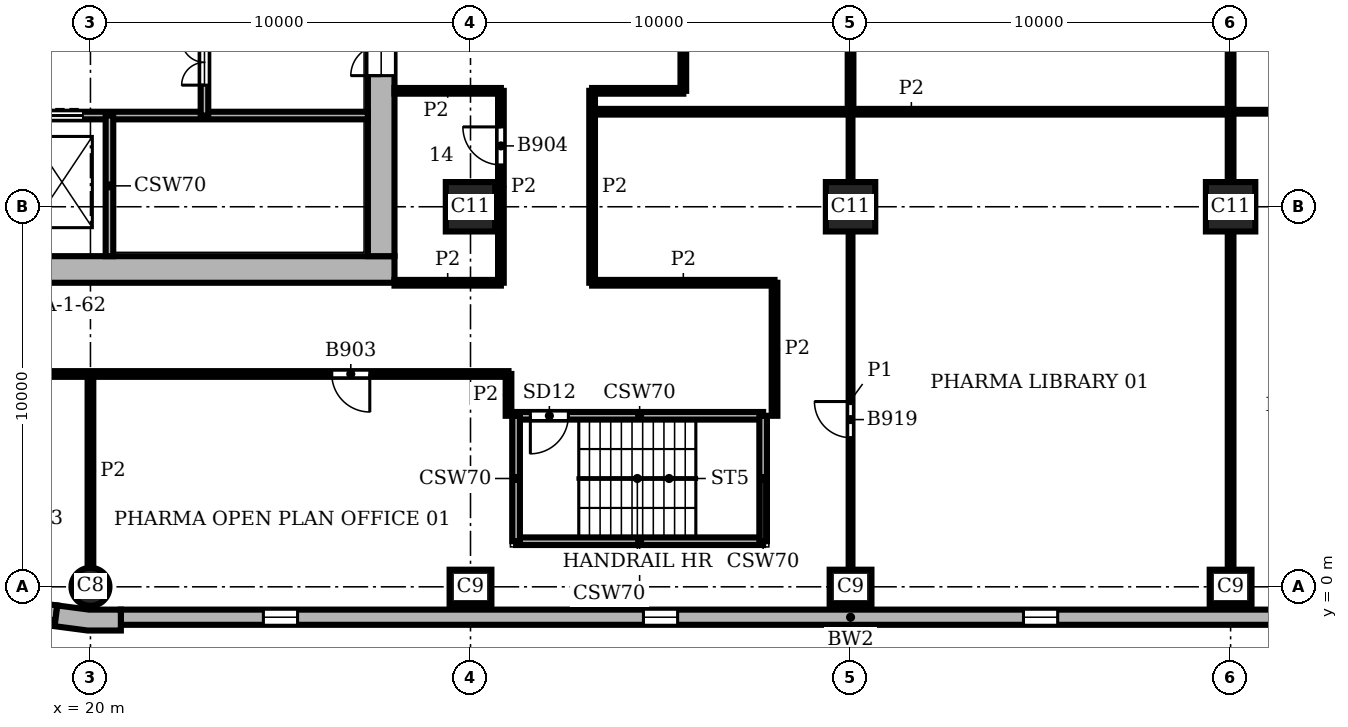
"""IFC4 building model, lengths in metres.
Left out: names, types, materials, properties, quantities, classifications, styles, units other than length and angle.
Written with IfcOpenShell. Run it as: python <this file> out.ifc"""

import sys

from ifc_helpers import new_model, si_unit, direction, frame, frame_2d, origin, origin_2d, place, context, subcontext, project, spatial, polyline, rectangle, circle, outline, extrude, element, fill, save


model = new_model("IFC4")
c1 = context("Model", 3, precision=1e-05, world=origin(), true_north=direction((0.0, 1.0)))
c2 = subcontext(c1, "Body", "Model", "MODEL_VIEW")
j1 = project(units=[si_unit("LENGTHUNIT", "METRE"), si_unit("PLANEANGLEUNIT", "RADIAN")], contexts=[c1])
p1 = place(None, origin())
s1 = spatial("IfcSite", under=j1, at=p1, CompositionType="ELEMENT")
p2 = place(p1, origin())
s2 = spatial("IfcBuilding", under=s1, at=p2, CompositionType="ELEMENT")
p3 = place(p2, frame((0.0, 0.0, 233.1)))
s3 = spatial("IfcBuildingStorey", under=s2, at=p3, CompositionType="ELEMENT", Elevation=233.1)
p4 = place(p3, frame((20.0, 0.0, 0.0), z_axis=(0.0, 0.0, 1.0), x_axis=(1.0, 0.0, 0.0)))
e1 = element("IfcColumn", 1, at=p4, inside=s3, PredefinedType="COLUMN", context=c2, shape_type="SweptSolid", body=[
    extrude(circle(Radius=0.5, at=origin_2d()), origin(), (0.0, 0.0, 1.0), 3.9),
])
for number, where, z_axis, x_axis in (
    (2, (30.0, 0.0, 0.0), (0.0, 0.0, 1.0), (1.0, 0.0, 0.0)),
    (3, (40.0, 0.0, 0.0), (0.0, 0.0, 1.0), (1.0, 0.0, 0.0)),
    (4, (50.0, 0.0, 0.0), (0.0, 0.0, 1.0), (1.0, 0.0, 0.0)),
):
    element("IfcColumn", number, at=place(p3, frame(where, z_axis=z_axis, x_axis=x_axis)), inside=s3, PredefinedType="COLUMN", context=c2, shape_type="SweptSolid", body=[
        extrude(rectangle(XDim=1.1, YDim=0.9, at=origin_2d()), origin(), (0.0, 0.0, 1.0), 3.9),
    ])
for number, where, z_axis, x_axis in (
    (5, (30.0, 10.0, 0.0), (0.0, 0.0, 1.0), (1.0, 0.0, 0.0)),
    (6, (40.0, 10.0, 0.0), (0.0, 0.0, 1.0), (1.0, 0.0, 0.0)),
    (7, (50.0, 10.0, 0.0), (0.0, 0.0, 1.0), (1.0, 0.0, 0.0)),
):
    element("IfcColumn", number, at=place(p3, frame(where, z_axis=z_axis, x_axis=x_axis)), inside=s3, PredefinedType="COLUMN", context=c2, shape_type="SweptSolid", body=[
        extrude(rectangle(XDim=1.3, YDim=1.3, at=origin_2d()), origin(), (0.0, 0.0, 1.0), 3.9),
    ])
p5 = place(p3, frame((8.0, 8.35, 0.0), z_axis=(0.0, 0.0, 1.0), x_axis=(1.0, 0.0, 0.0)))
e8 = element("IfcWall", 8, at=p5, inside=s3, PredefinedType="SHEAR", context=c2, shape_type="SweptSolid", body=[
    extrude(rectangle(XDim=20.0, YDim=0.7, at=frame_2d((10.0, 0.0))), origin(), (0.0, 0.0, 1.0), 3.9),
])
p6 = place(p3, frame((27.65, 8.7, 0.0), z_axis=(0.0, 0.0, 1.0), x_axis=(0.0, 1.0, 0.0)))
e9 = element("IfcWall", 9, at=p6, inside=s3, PredefinedType="SHEAR", context=c2, shape_type="SweptSolid", body=[
    extrude(rectangle(XDim=18.6, YDim=0.7, at=frame_2d((9.3, 0.0))), origin(), (0.0, 0.0, 1.0), 3.9),
])
p7 = place(p6, frame((4.75, 0.0, 0.0)))
e10 = element("IfcOpeningElement", 10, at=p7, cuts=e9, PredefinedType="OPENING", context=c2, shape_type="SweptSolid", body=[
    extrude(rectangle(XDim=1.6, YDim=2.1, at=frame_2d((0.8, 1.05))), frame((0.0, 0.36, 0.0), z_axis=(0.0, -1.0, 0.0), x_axis=(1.0, 0.0, 0.0)), (0.0, 0.0, 1.0), 0.72),
])
p8 = place(p3, origin())
e11 = element("IfcWall", 11, at=p8, inside=s3, PredefinedType="SOLIDWALL", context=c2, shape_type="SweptSolid", body=[
    extrude(outline(polyline([(19.076, -0.887), (19.057, -1.036), (19.925, -1.15), (20.8, -1.15), (20.8, -1.0), (20.8, -0.6), (19.961, -0.6), (19.128, -0.49), (19.076, -0.887)])), origin(), (0.0, 0.0, 1.0), 3.9),
])
p9 = place(p3, frame((20.8, -0.8, 0.0), z_axis=(0.0, 0.0, 1.0), x_axis=(1.0, 0.0, 0.0)))
e12 = element("IfcWall", 12, at=p9, inside=s3, PredefinedType="SOLIDWALL", context=c2, shape_type="SweptSolid", body=[
    extrude(rectangle(XDim=38.4, YDim=0.4, at=frame_2d((19.2, 0.0))), origin(), (0.0, 0.0, 1.0), 3.9),
])
p10 = place(p9, frame((3.75, 0.0, 0.9)))
e13 = element("IfcOpeningElement", 13, at=p10, cuts=e12, PredefinedType="OPENING", context=c2, shape_type="SweptSolid", body=[
    extrude(rectangle(XDim=0.9, YDim=2.35, at=frame_2d((0.45, 1.175))), frame((0.0, 0.21, 0.0), z_axis=(0.0, -1.0, 0.0), x_axis=(1.0, 0.0, 0.0)), (0.0, 0.0, 1.0), 0.42),
])
p11 = place(p9, frame((13.75, 0.0, 0.9)))
e14 = element("IfcOpeningElement", 14, at=p11, cuts=e12, PredefinedType="OPENING", context=c2, shape_type="SweptSolid", body=[
    extrude(rectangle(XDim=0.9, YDim=2.35, at=frame_2d((0.45, 1.175))), frame((0.0, 0.21, 0.0), z_axis=(0.0, -1.0, 0.0), x_axis=(1.0, 0.0, 0.0)), (0.0, 0.0, 1.0), 0.42),
])
p12 = place(p9, frame((23.75, 0.0, 0.9)))
e15 = element("IfcOpeningElement", 15, at=p12, cuts=e12, PredefinedType="OPENING", context=c2, shape_type="SweptSolid", body=[
    extrude(rectangle(XDim=0.9, YDim=2.35, at=frame_2d((0.45, 1.175))), frame((0.0, 0.21, 0.0), z_axis=(0.0, -1.0, 0.0), x_axis=(1.0, 0.0, 0.0)), (0.0, 0.0, 1.0), 0.42),
])
p13 = place(p9, frame((33.75, 0.0, 0.9)))
e16 = element("IfcOpeningElement", 16, at=p13, cuts=e12, PredefinedType="OPENING", context=c2, shape_type="SweptSolid", body=[
    extrude(rectangle(XDim=0.9, YDim=2.35, at=frame_2d((0.45, 1.175))), frame((0.0, 0.21, 0.0), z_axis=(0.0, -1.0, 0.0), x_axis=(1.0, 0.0, 0.0)), (0.0, 0.0, 1.0), 0.42),
])
p14 = place(p3, frame((15.017, -0.151, 0.0), z_axis=(0.0, 0.0, 1.0), x_axis=(0.991446429508, -0.130514280502, 0.0)))
e17 = element("IfcWall", 17, at=p14, inside=s3, PredefinedType="SOLIDWALL", context=c2, shape_type="SweptSolid", body=[
    extrude(rectangle(XDim=4.121, YDim=0.4, at=frame_2d((2.061, 0.0))), origin(), (0.0, 0.0, 1.0), 3.9),
])
p15 = place(p14, frame((1.611, 0.0, 0.9)))
e18 = element("IfcOpeningElement", 18, at=p15, cuts=e17, PredefinedType="OPENING", context=c2, shape_type="SweptSolid", body=[
    extrude(rectangle(XDim=0.9, YDim=2.35, at=frame_2d((0.45, 1.175))), frame((0.0, 0.21, 0.0), z_axis=(0.0, -1.0, 0.0), x_axis=(1.0, 0.0, 0.0)), (0.0, 0.0, 1.0), 0.42),
])
p16 = place(p3, frame((31.2, 1.2, 0.0), z_axis=(0.0, 0.0, 1.0), x_axis=(1.0, 0.0, 0.0)))
e19 = element("IfcWall", 19, at=p16, inside=s3, PredefinedType="SHEAR", context=c2, shape_type="SweptSolid", body=[
    extrude(rectangle(XDim=6.5, YDim=0.2, at=frame_2d((3.25, 0.0))), origin(), (0.0, 0.0, 1.0), 3.45),
])
p17 = place(p3, frame((31.2, 4.5, 0.0), z_axis=(0.0, 0.0, 1.0), x_axis=(1.0, 0.0, 0.0)))
e20 = element("IfcWall", 20, at=p17, inside=s3, PredefinedType="SHEAR", context=c2, shape_type="SweptSolid", body=[
    extrude(rectangle(XDim=6.5, YDim=0.2, at=frame_2d((3.25, 0.0))), origin(), (0.0, 0.0, 1.0), 3.45),
])
p18 = place(p17, frame((0.375, 0.0, 0.0)))
e21 = element("IfcOpeningElement", 21, at=p18, cuts=e20, PredefinedType="OPENING", context=c2, shape_type="SweptSolid", body=[
    extrude(rectangle(XDim=1.0, YDim=2.1, at=frame_2d((0.5, 1.05))), frame((0.0, 0.11, 0.0), z_axis=(0.0, -1.0, 0.0), x_axis=(1.0, 0.0, 0.0)), (0.0, 0.0, 1.0), 0.22),
])
p19 = place(p3, frame((13.8, 12.4, 0.0), z_axis=(0.0, 0.0, 1.0), x_axis=(1.0, 0.0, 0.0)))
e22 = element("IfcWall", 22, at=p19, inside=s3, PredefinedType="SHEAR", context=c2, shape_type="SweptSolid", body=[
    extrude(rectangle(XDim=13.5, YDim=0.2, at=frame_2d((6.75, 0.0))), origin(), (0.0, 0.0, 1.0), 3.45),
])
p20 = place(p19, frame((2.4, 0.0, 0.0)))
e23 = element("IfcOpeningElement", 23, at=p20, cuts=e22, PredefinedType="OPENING", context=c2, shape_type="SweptSolid", body=[
    extrude(rectangle(XDim=1.1, YDim=2.1, at=frame_2d((0.55, 1.05))), frame((0.0, 0.11, 0.0), z_axis=(0.0, -1.0, 0.0), x_axis=(1.0, 0.0, 0.0)), (0.0, 0.0, 1.0), 0.22),
])
p21 = place(p19, frame((4.9, 0.0, 0.0)))
e24 = element("IfcOpeningElement", 24, at=p21, cuts=e22, PredefinedType="OPENING", context=c2, shape_type="SweptSolid", body=[
    extrude(rectangle(XDim=1.1, YDim=2.1, at=frame_2d((0.55, 1.05))), frame((0.0, 0.11, 0.0), z_axis=(0.0, -1.0, 0.0), x_axis=(1.0, 0.0, 0.0)), (0.0, 0.0, 1.0), 0.22),
])
p22 = place(p19, frame((0.2, 0.0, 0.0)))
e25 = element("IfcOpeningElement", 25, at=p22, cuts=e22, PredefinedType="OPENING", context=c2, shape_type="SweptSolid", body=[
    extrude(rectangle(XDim=1.0, YDim=2.1, at=frame_2d((0.5, 1.05))), frame((0.0, 0.11, 0.0), z_axis=(0.0, -1.0, 0.0), x_axis=(1.0, 0.0, 0.0)), (0.0, 0.0, 1.0), 0.22),
])
p23 = place(p3, frame((20.5, 8.7, 0.0), z_axis=(0.0, 0.0, 1.0), x_axis=(0.0, 1.0, 0.0)))
e26 = element("IfcWall", 26, at=p23, inside=s3, PredefinedType="SHEAR", context=c2, shape_type="SweptSolid", body=[
    extrude(rectangle(XDim=3.7, YDim=0.2, at=frame_2d((1.85, 0.0))), origin(), (0.0, 0.0, 1.0), 3.45),
])
p24 = place(p3, frame((23.0, 12.4, 0.0), z_axis=(0.0, 0.0, 1.0), x_axis=(0.0, 1.0, 0.0)))
e27 = element("IfcWall", 27, at=p24, inside=s3, PredefinedType="SHEAR", context=c2, shape_type="SweptSolid", body=[
    extrude(rectangle(XDim=2.8, YDim=0.2, at=frame_2d((1.4, 0.0))), origin(), (0.0, 0.0, 1.0), 3.45),
])
p25 = place(p24, frame((0.8, 0.0, 0.0)))
e28 = element("IfcOpeningElement", 28, at=p25, cuts=e27, PredefinedType="OPENING", context=c2, shape_type="SweptSolid", body=[
    extrude(rectangle(XDim=1.2, YDim=2.1, at=frame_2d((0.6, 1.05))), frame((0.0, 0.11, 0.0), z_axis=(0.0, -1.0, 0.0), x_axis=(1.0, 0.0, 0.0)), (0.0, 0.0, 1.0), 0.22),
])
for number, where, z_axis, x_axis in (
    (29, (31.2, 1.2, 0.0), (0.0, 0.0, 1.0), (0.0, 1.0, 0.0)),
    (30, (37.7, 1.2, 0.0), (0.0, 0.0, 1.0), (0.0, 1.0, 0.0)),
):
    element("IfcWall", number, at=place(p3, frame(where, z_axis=z_axis, x_axis=x_axis)), inside=s3, PredefinedType="SHEAR", context=c2, shape_type="SweptSolid", body=[
        extrude(rectangle(XDim=3.3, YDim=0.2, at=frame_2d((1.65, 0.0))), origin(), (0.0, 0.0, 1.0), 3.45),
    ])
p26 = place(p3, frame((40.0, 0.45, 0.0), z_axis=(0.0, 0.0, 1.0), x_axis=(0.0, 1.0, 0.0)))
e31 = element("IfcWall", 31, at=p26, inside=s3, PredefinedType="PARTITIONING", context=c2, shape_type="SweptSolid", body=[
    extrude(rectangle(XDim=8.9, YDim=0.1, at=frame_2d((4.45, 0.0))), origin(), (0.0, 0.0, 1.0), 3.45),
])
p27 = place(p26, frame((3.475, 0.0, 0.0)))
e32 = element("IfcOpeningElement", 32, at=p27, cuts=e31, PredefinedType="OPENING", context=c2, shape_type="SweptSolid", body=[
    extrude(rectangle(XDim=0.95, YDim=2.1, at=frame_2d((0.475, 1.05))), frame((0.0, 0.06, 0.0), z_axis=(0.0, -1.0, 0.0), x_axis=(1.0, 0.0, 0.0)), (0.0, 0.0, 1.0), 0.12),
])
p28 = place(p3, frame((40.0, 10.65, 0.0), z_axis=(0.0, 0.0, 1.0), x_axis=(0.0, 1.0, 0.0)))
e33 = element("IfcWall", 33, at=p28, inside=s3, PredefinedType="PARTITIONING", context=c2, shape_type="SweptSolid", body=[
    extrude(rectangle(XDim=1.85, YDim=0.1, at=frame_2d((0.925, 0.0))), origin(), (0.0, 0.0, 1.0), 3.45),
])
p29 = place(p3, frame((50.0, 12.5, 0.0), z_axis=(0.0, 0.0, 1.0), x_axis=(1.0, 0.0, 0.0)))
e34 = element("IfcWall", 34, at=p29, inside=s3, PredefinedType="PARTITIONING", context=c2, shape_type="SweptSolid", body=[
    extrude(rectangle(XDim=5.0, YDim=0.1, at=frame_2d((2.5, 0.0))), origin(), (0.0, 0.0, 1.0), 3.45),
])
p30 = place(p3, frame((20.0, 0.5, 0.0), z_axis=(0.0, 0.0, 1.0), x_axis=(0.0, 1.0, 0.0)))
e35 = element("IfcWall", 35, at=p30, inside=s3, PredefinedType="PARTITIONING", context=c2, shape_type="SweptSolid", body=[
    extrude(rectangle(XDim=5.1, YDim=0.15, at=frame_2d((2.55, 0.0))), origin(), (0.0, 0.0, 1.0), 3.45),
])
p31 = place(p3, frame((30.8, 8.001, 0.0), z_axis=(0.0, 0.0, 1.0), x_axis=(0.0, 1.0, 0.0)))
e36 = element("IfcWall", 36, at=p31, inside=s3, PredefinedType="PARTITIONING", context=c2, shape_type="SweptSolid", body=[
    extrude(rectangle(XDim=5.048, YDim=0.15, at=frame_2d((2.524, 0.0))), origin(), (0.0, 0.0, 1.0), 3.45),
])
p32 = place(p31, frame((3.1, 0.0, 0.0)))
e37 = element("IfcOpeningElement", 37, at=p32, cuts=e36, PredefinedType="OPENING", context=c2, shape_type="SweptSolid", body=[
    extrude(rectangle(XDim=1.0, YDim=2.1, at=frame_2d((0.5, 1.05))), frame((0.0, 0.085, 0.0), z_axis=(0.0, -1.0, 0.0), x_axis=(1.0, 0.0, 0.0)), (0.0, 0.0, 1.0), 0.17),
])
p33 = place(p3, frame((31.0, 4.5, 0.0), z_axis=(0.0, 0.0, 1.0), x_axis=(0.0, 1.0, 0.0)))
e38 = element("IfcWall", 38, at=p33, inside=s3, PredefinedType="PARTITIONING", context=c2, shape_type="SweptSolid", body=[
    extrude(rectangle(XDim=1.1, YDim=0.15, at=frame_2d((0.55, 0.0))), origin(), (0.0, 0.0, 1.0), 3.45),
])
p34 = place(p3, frame((33.2, 8.0, 0.0), z_axis=(0.0, 0.0, 1.0), x_axis=(0.0, 1.0, 0.0)))
e39 = element("IfcWall", 39, at=p34, inside=s3, PredefinedType="PARTITIONING", context=c2, shape_type="SweptSolid", body=[
    extrude(rectangle(XDim=5.05, YDim=0.15, at=frame_2d((2.525, 0.0))), origin(), (0.0, 0.0, 1.0), 3.45),
])
p35 = place(p3, frame((35.6, 13.05, 0.0), z_axis=(0.0, 0.0, 1.0), x_axis=(0.0, 1.0, 0.0)))
e40 = element("IfcWall", 40, at=p35, inside=s3, PredefinedType="PARTITIONING", context=c2, shape_type="SweptSolid", body=[
    extrude(rectangle(XDim=2.4, YDim=0.15, at=frame_2d((1.2, 0.0))), origin(), (0.0, 0.0, 1.0), 3.45),
])
p36 = place(p3, frame((38.0, 4.5, 0.0), z_axis=(0.0, 0.0, 1.0), x_axis=(0.0, 1.0, 0.0)))
e41 = element("IfcWall", 41, at=p36, inside=s3, PredefinedType="PARTITIONING", context=c2, shape_type="SweptSolid", body=[
    extrude(rectangle(XDim=3.5, YDim=0.15, at=frame_2d((1.75, 0.0))), origin(), (0.0, 0.0, 1.0), 3.45),
])
p37 = place(p3, frame((40.0, 12.5, 0.0), z_axis=(0.0, 0.0, 1.0), x_axis=(0.0, 1.0, 0.0)))
e42 = element("IfcWall", 42, at=p37, inside=s3, PredefinedType="PARTITIONING", context=c2, shape_type="SweptSolid", body=[
    extrude(rectangle(XDim=6.85, YDim=0.15, at=frame_2d((3.425, 0.0))), origin(), (0.0, 0.0, 1.0), 3.45),
])
p38 = place(p3, frame((50.0, 0.45, 0.0), z_axis=(0.0, 0.0, 1.0), x_axis=(0.0, 1.0, 0.0)))
e43 = element("IfcWall", 43, at=p38, inside=s3, PredefinedType="PARTITIONING", context=c2, shape_type="SweptSolid", body=[
    extrude(rectangle(XDim=8.9, YDim=0.15, at=frame_2d((4.45, 0.0))), origin(), (0.0, 0.0, 1.0), 3.45),
])
p39 = place(p3, frame((50.0, 10.65, 0.0), z_axis=(0.0, 0.0, 1.0), x_axis=(0.0, 1.0, 0.0)))
e44 = element("IfcWall", 44, at=p39, inside=s3, PredefinedType="PARTITIONING", context=c2, shape_type="SweptSolid", body=[
    extrude(rectangle(XDim=8.7, YDim=0.15, at=frame_2d((4.35, 0.0))), origin(), (0.0, 0.0, 1.0), 3.45),
])
p40 = place(p3, frame((5.6, 5.6, 0.0), z_axis=(0.0, 0.0, 1.0), x_axis=(1.0, 0.0, 0.0)))
e45 = element("IfcWall", 45, at=p40, inside=s3, PredefinedType="PARTITIONING", context=c2, shape_type="SweptSolid", body=[
    extrude(rectangle(XDim=25.4, YDim=0.15, at=frame_2d((12.7, 0.0))), origin(), (0.0, 0.0, 1.0), 3.45),
])
p41 = place(p40, frame((20.75, 0.0, 0.0)))
e46 = element("IfcOpeningElement", 46, at=p41, cuts=e45, PredefinedType="OPENING", context=c2, shape_type="SweptSolid", body=[
    extrude(rectangle(XDim=1.0, YDim=2.1, at=frame_2d((0.5, 1.05))), frame((0.0, 0.085, 0.0), z_axis=(0.0, -1.0, 0.0), x_axis=(1.0, 0.0, 0.0)), (0.0, 0.0, 1.0), 0.17),
])
p42 = place(p40, frame((5.35, 0.0, 0.0)))
e47 = element("IfcOpeningElement", 47, at=p42, cuts=e45, PredefinedType="OPENING", context=c2, shape_type="SweptSolid", body=[
    extrude(rectangle(XDim=0.8, YDim=2.1, at=frame_2d((0.4, 1.05))), frame((0.0, 0.085, 0.0), z_axis=(0.0, -1.0, 0.0), x_axis=(1.0, 0.0, 0.0)), (0.0, 0.0, 1.0), 0.17),
])
p43 = place(p40, frame((11.5, 0.0, 0.0)))
e48 = element("IfcOpeningElement", 48, at=p43, cuts=e45, PredefinedType="OPENING", context=c2, shape_type="SweptSolid", body=[
    extrude(rectangle(XDim=0.8, YDim=2.1, at=frame_2d((0.4, 1.05))), frame((0.0, 0.085, 0.0), z_axis=(0.0, -1.0, 0.0), x_axis=(1.0, 0.0, 0.0)), (0.0, 0.0, 1.0), 0.17),
])
p44 = place(p3, frame((28.0, 8.0, 0.0), z_axis=(0.0, 0.0, 1.0), x_axis=(1.0, 0.0, 0.0)))
e49 = element("IfcWall", 49, at=p44, inside=s3, PredefinedType="PARTITIONING", context=c2, shape_type="SweptSolid", body=[
    extrude(rectangle(XDim=2.799, YDim=0.15, at=frame_2d((1.399, 0.0))), origin(), (0.0, 0.0, 1.0), 3.45),
])
p45 = place(p3, frame((33.2, 8.0, 0.0), z_axis=(0.0, 0.0, 1.0), x_axis=(1.0, 0.0, 0.0)))
e50 = element("IfcWall", 50, at=p45, inside=s3, PredefinedType="PARTITIONING", context=c2, shape_type="SweptSolid", body=[
    extrude(rectangle(XDim=4.8, YDim=0.15, at=frame_2d((2.4, 0.0))), origin(), (0.0, 0.0, 1.0), 3.45),
])
p46 = place(p3, frame((33.2, 12.5, 0.0), z_axis=(0.0, 0.0, 1.0), x_axis=(1.0, 0.0, 0.0)))
e51 = element("IfcWall", 51, at=p46, inside=s3, PredefinedType="PARTITIONING", context=c2, shape_type="SweptSolid", body=[
    extrude(rectangle(XDim=16.8, YDim=0.15, at=frame_2d((8.4, 0.0))), origin(), (0.0, 0.0, 1.0), 3.45),
])
p47 = place(p3, frame((28.0, 13.05, 0.0), z_axis=(0.0, 0.0, 1.0), x_axis=(1.0, 0.0, 0.0)))
e52 = element("IfcWall", 52, at=p47, inside=s3, PredefinedType="PARTITIONING", context=c2, shape_type="SweptSolid", body=[
    extrude(rectangle(XDim=2.799, YDim=0.15, at=frame_2d((1.399, 0.0))), origin(), (0.0, 0.0, 1.0), 3.45),
])
p48 = place(p3, frame((33.2, 13.05, 0.0), z_axis=(0.0, 0.0, 1.0), x_axis=(1.0, 0.0, 0.0)))
e53 = element("IfcWall", 53, at=p48, inside=s3, PredefinedType="PARTITIONING", context=c2, shape_type="SweptSolid", body=[
    extrude(rectangle(XDim=2.4, YDim=0.15, at=frame_2d((1.2, 0.0))), origin(), (0.0, 0.0, 1.0), 3.45),
])
p49 = place(p10, origin())
e54 = element("IfcWindow", 54, at=p49, inside=s3, PartitioningType="SINGLE_PANEL", PredefinedType="WINDOW", context=c2, shape_type="SweptSolid", body=[
    extrude(rectangle(XDim=0.9, YDim=2.35, at=frame_2d((0.45, 1.175))), frame((0.0, 0.16, 0.0), z_axis=(0.0, -1.0, 0.0), x_axis=(1.0, 0.0, 0.0)), (0.0, 0.0, 1.0), 0.06),
])
fill(e13, e54)
p50 = place(p11, origin())
e55 = element("IfcWindow", 55, at=p50, inside=s3, PartitioningType="SINGLE_PANEL", PredefinedType="WINDOW", context=c2, shape_type="SweptSolid", body=[
    extrude(rectangle(XDim=0.9, YDim=2.35, at=frame_2d((0.45, 1.175))), frame((0.0, 0.16, 0.0), z_axis=(0.0, -1.0, 0.0), x_axis=(1.0, 0.0, 0.0)), (0.0, 0.0, 1.0), 0.06),
])
fill(e14, e55)
p51 = place(p12, origin())
e56 = element("IfcWindow", 56, at=p51, inside=s3, PartitioningType="SINGLE_PANEL", PredefinedType="WINDOW", context=c2, shape_type="SweptSolid", body=[
    extrude(rectangle(XDim=0.9, YDim=2.35, at=frame_2d((0.45, 1.175))), frame((0.0, 0.16, 0.0), z_axis=(0.0, -1.0, 0.0), x_axis=(1.0, 0.0, 0.0)), (0.0, 0.0, 1.0), 0.06),
])
fill(e15, e56)
p52 = place(p21, origin())
e57 = element("IfcDoor", 57, at=p52, inside=s3, OperationType="DOUBLE_DOOR_SLIDING", PredefinedType="DOOR", context=c2, shape_type="SweptSolid", body=[
    extrude(rectangle(XDim=1.1, YDim=2.1, at=frame_2d((0.55, 1.05))), frame((0.0, 0.025, 0.0), z_axis=(0.0, -1.0, 0.0), x_axis=(1.0, 0.0, 0.0)), (0.0, 0.0, 1.0), 0.05),
])
fill(e24, e57)
p53 = place(p18, frame((1.0, 0.0, 0.0), z_axis=(0.0, 0.0, 1.0), x_axis=(-1.0, 0.0, 0.0)))
e58 = element("IfcDoor", 58, at=p53, inside=s3, OperationType="SINGLE_SWING_RIGHT", PredefinedType="DOOR", context=c2, shape_type="SweptSolid", body=[
    extrude(rectangle(XDim=1.0, YDim=2.1, at=frame_2d((0.5, 1.05))), frame((0.0, 0.025, 0.0), z_axis=(0.0, -1.0, 0.0), x_axis=(1.0, 0.0, 0.0)), (0.0, 0.0, 1.0), 0.05),
])
fill(e21, e58)
p54 = place(p25, origin())
e59 = element("IfcDoor", 59, at=p54, inside=s3, OperationType="DOUBLE_DOOR_SINGLE_SWING", PredefinedType="DOOR", context=c2, shape_type="SweptSolid", body=[
    extrude(rectangle(XDim=1.2, YDim=2.1, at=frame_2d((0.6, 1.05))), frame((0.0, 0.025, 0.0), z_axis=(0.0, -1.0, 0.0), x_axis=(1.0, 0.0, 0.0)), (0.0, 0.0, 1.0), 0.05),
])
fill(e28, e59)
p55 = place(p7, origin())
e60 = element("IfcDoor", 60, at=p55, inside=s3, OperationType="DOUBLE_DOOR_SINGLE_SWING", PredefinedType="DOOR", context=c2, shape_type="SweptSolid", body=[
    extrude(rectangle(XDim=1.6, YDim=2.1, at=frame_2d((0.8, 1.05))), frame((0.0, 0.025, 0.0), z_axis=(0.0, -1.0, 0.0), x_axis=(1.0, 0.0, 0.0)), (0.0, 0.0, 1.0), 0.05),
])
fill(e10, e60)
p56 = place(p41, frame((1.0, 0.0, 0.0), z_axis=(0.0, 0.0, 1.0), x_axis=(-1.0, 0.0, 0.0)))
e61 = element("IfcDoor", 61, at=p56, inside=s3, OperationType="SINGLE_SWING_LEFT", PredefinedType="DOOR", context=c2, shape_type="SweptSolid", body=[
    extrude(rectangle(XDim=1.0, YDim=2.1, at=frame_2d((0.5, 1.05))), frame((0.0, 0.025, 0.0), z_axis=(0.0, -1.0, 0.0), x_axis=(1.0, 0.0, 0.0)), (0.0, 0.0, 1.0), 0.05),
])
fill(e46, e61)
p57 = place(p32, origin())
e62 = element("IfcDoor", 62, at=p57, inside=s3, OperationType="SINGLE_SWING_RIGHT", PredefinedType="DOOR", context=c2, shape_type="SweptSolid", body=[
    extrude(rectangle(XDim=1.0, YDim=2.1, at=frame_2d((0.5, 1.05))), frame((0.0, 0.025, 0.0), z_axis=(0.0, -1.0, 0.0), x_axis=(1.0, 0.0, 0.0)), (0.0, 0.0, 1.0), 0.05),
])
fill(e37, e62)
p58 = place(p27, origin())
e63 = element("IfcDoor", 63, at=p58, inside=s3, OperationType="SINGLE_SWING_RIGHT", PredefinedType="DOOR", context=c2, shape_type="SweptSolid", body=[
    extrude(rectangle(XDim=0.95, YDim=2.1, at=frame_2d((0.475, 1.05))), frame((0.0, 0.025, 0.0), z_axis=(0.0, -1.0, 0.0), x_axis=(1.0, 0.0, 0.0)), (0.0, 0.0, 1.0), 0.05),
])
fill(e32, e63)
save(model, sys.argv[1])
